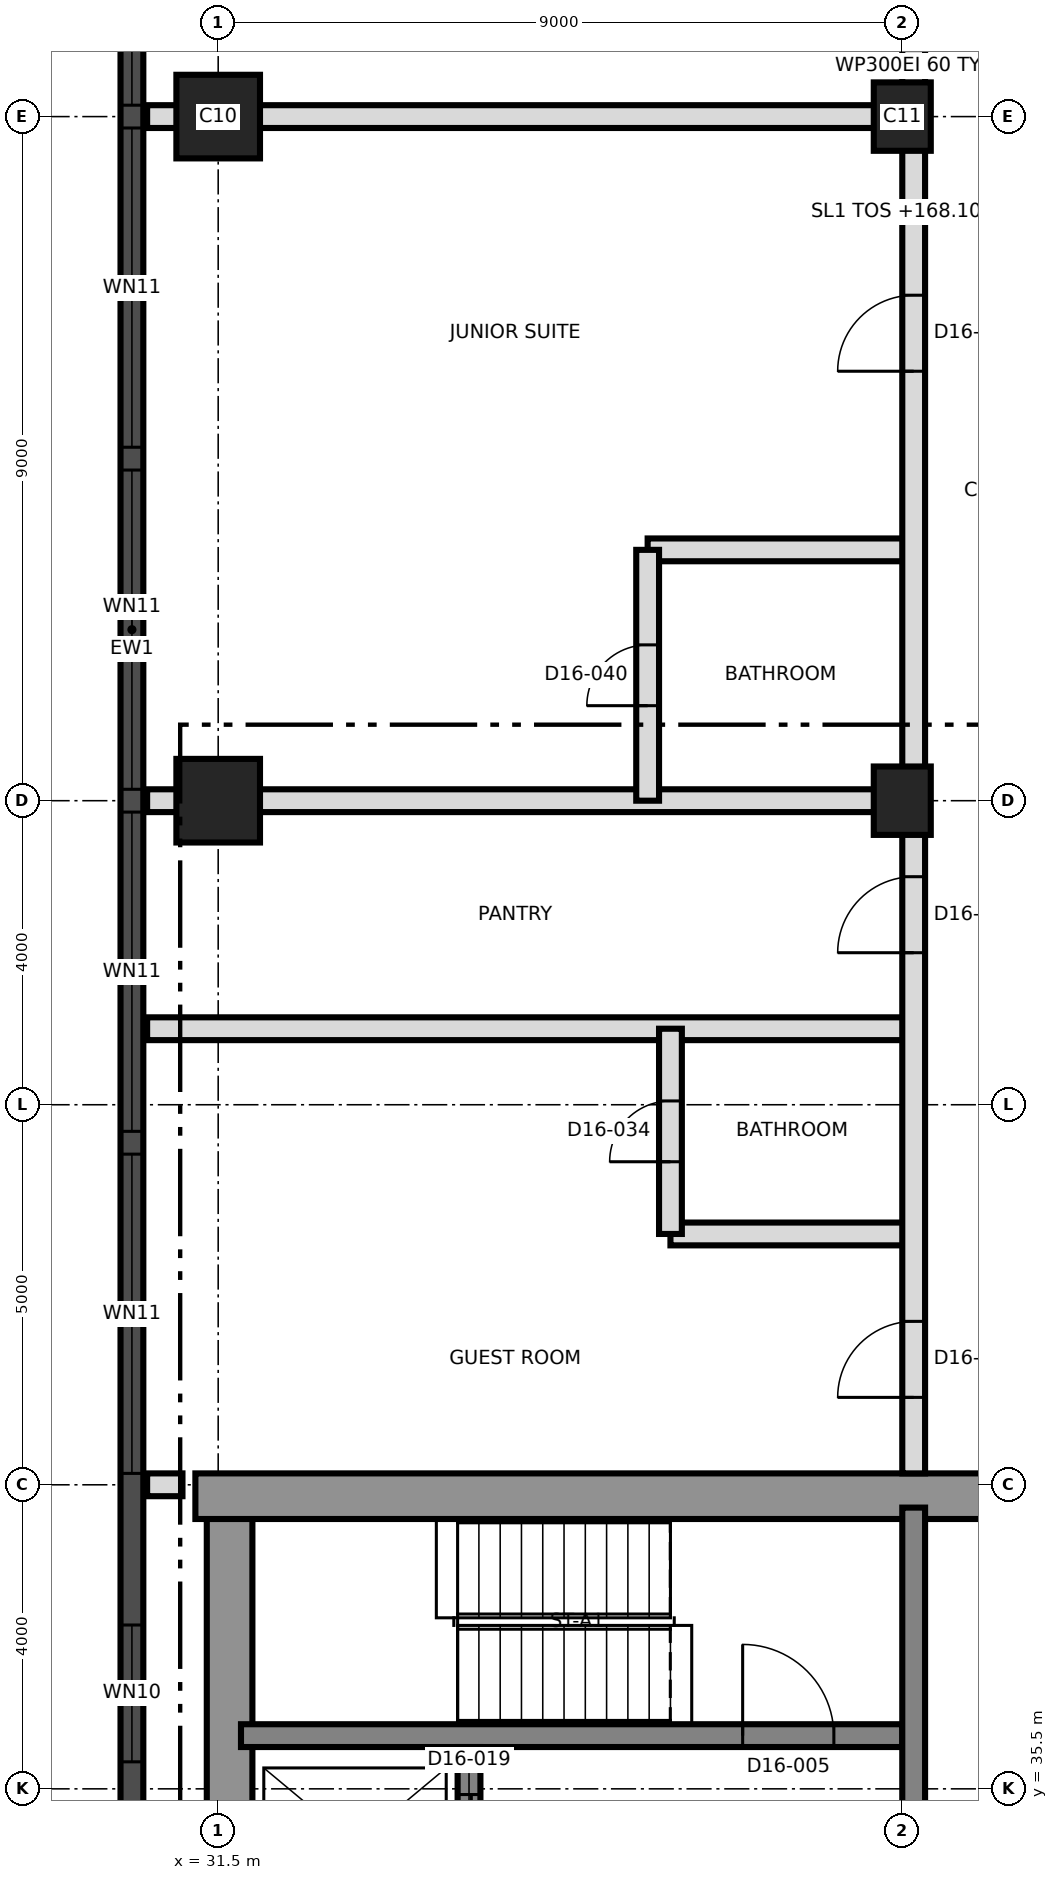
"""IFC4 building model, lengths in metres.
Left out: names, types, materials, properties, quantities, classifications, styles, units other than length and angle.
Written with IfcOpenShell. Run it as: python <this file> out.ifc"""

import sys

from ifc_helpers import new_model, si_unit, direction, frame, frame_2d, origin, origin_2d, place, context, subcontext, project, spatial, rectangle, extrude, element, fill, save


model = new_model("IFC4")
c1 = context("Model", 3, precision=1e-05, world=origin(), true_north=direction((0.0, 1.0)))
c2 = subcontext(c1, "Body", "Model", "MODEL_VIEW")
j1 = project(units=[si_unit("LENGTHUNIT", "METRE"), si_unit("PLANEANGLEUNIT", "RADIAN")], contexts=[c1])
p1 = place(None, origin())
s1 = spatial("IfcSite", under=j1, at=p1, CompositionType="ELEMENT")
p2 = place(p1, origin())
s2 = spatial("IfcBuilding", under=s1, at=p2, CompositionType="ELEMENT")
p3 = place(p2, frame((0.0, 0.0, 168.1)))
s3 = spatial("IfcBuildingStorey", under=s2, at=p3, CompositionType="ELEMENT", Elevation=168.1)
p4 = place(p3, frame((31.65, 21.8, 0.0), z_axis=(0.0, 0.0, 1.0), x_axis=(0.0, 1.0, 0.0)))
e1 = element("IfcWall", 1, at=p4, inside=s3, PredefinedType="SHEAR", context=c2, shape_type="SweptSolid", body=[
    extrude(rectangle(XDim=17.4, YDim=0.6, at=frame_2d((8.7, 0.0))), origin(), (0.0, 0.0, 1.0), 3.7),
])
p5 = place(p3, frame((31.2, 39.35, 0.0), z_axis=(0.0, 0.0, 1.0), x_axis=(1.0, 0.0, 0.0)))
e2 = element("IfcWall", 2, at=p5, inside=s3, PredefinedType="SHEAR", context=c2, shape_type="SweptSolid", body=[
    extrude(rectangle(XDim=27.0, YDim=0.6, at=frame_2d((13.5, 0.0))), origin(), (0.0, 0.0, 1.0), 3.7),
])
p6 = place(p5, frame((10.5, 0.0, 0.0)))
e3 = element("IfcOpeningElement", 3, at=p6, cuts=e2, PredefinedType="OPENING", context=c2, shape_type="SweptSolid", body=[
    extrude(rectangle(XDim=1.2, YDim=2.1, at=frame_2d((0.6, 1.05))), frame((0.0, 0.31, 0.0), z_axis=(0.0, -1.0, 0.0), x_axis=(1.0, 0.0, 0.0)), (0.0, 0.0, 1.0), 0.62),
])
p7 = place(p3, frame((31.8, 36.2, 0.0), z_axis=(0.0, 0.0, 1.0), x_axis=(1.0, 0.0, 0.0)))
e4 = element("IfcWall", 4, at=p7, inside=s3, PredefinedType="SHEAR", context=c2, shape_type="SweptSolid", body=[
    extrude(rectangle(XDim=8.7, YDim=0.3, at=frame_2d((4.35, 0.0))), origin(), (0.0, 0.0, 1.0), 3.7),
])
p8 = place(p7, frame((6.6, 0.0, 0.0)))
e5 = element("IfcOpeningElement", 5, at=p8, cuts=e4, PredefinedType="OPENING", context=c2, shape_type="SweptSolid", body=[
    extrude(rectangle(XDim=1.2, YDim=2.1, at=frame_2d((0.6, 1.05))), frame((0.0, 0.16, 0.0), z_axis=(0.0, -1.0, 0.0), x_axis=(1.0, 0.0, 0.0)), (0.0, 0.0, 1.0), 0.32),
])
p9 = place(p3, frame((40.65, 33.5, 0.0), z_axis=(0.0, 0.0, 1.0), x_axis=(0.0, 1.0, 0.0)))
e6 = element("IfcWall", 6, at=p9, inside=s3, PredefinedType="SHEAR", context=c2, shape_type="SweptSolid", body=[
    extrude(rectangle(XDim=5.7, YDim=0.3, at=frame_2d((2.85, 0.0))), origin(), (0.0, 0.0, 1.0), 3.7),
])
p10 = place(p3, frame((34.8, 33.5, 0.0), z_axis=(0.0, 0.0, 1.0), x_axis=(0.0, 1.0, 0.0)))
e7 = element("IfcWall", 7, at=p10, inside=s3, PredefinedType="SHEAR", context=c2, shape_type="SweptSolid", body=[
    extrude(rectangle(XDim=2.55, YDim=0.3, at=frame_2d((1.275, 0.0))), origin(), (0.0, 0.0, 1.0), 3.7),
])
p11 = place(p10, frame((0.625, 0.0, 0.0)))
e8 = element("IfcOpeningElement", 8, at=p11, cuts=e7, PredefinedType="OPENING", context=c2, shape_type="SweptSolid", body=[
    extrude(rectangle(XDim=1.3, YDim=2.4, at=frame_2d((0.65, 1.2))), frame((0.0, 0.16, 0.0), z_axis=(0.0, -1.0, 0.0), x_axis=(1.0, 0.0, 0.0)), (0.0, 0.0, 1.0), 0.32),
])
p12 = place(p3, frame((31.5, 48.5, 0.0), z_axis=(0.0, 0.0, 1.0), x_axis=(1.0, 0.0, 0.0)))
e9 = element("IfcColumn", 9, at=p12, inside=s3, PredefinedType="COLUMN", context=c2, shape_type="SweptSolid", body=[
    extrude(rectangle(XDim=1.1, YDim=1.1, at=origin_2d()), origin(), (0.0, 0.0, 1.0), 3.7),
])
p13 = place(p3, frame((40.5, 48.5, 0.0), z_axis=(0.0, 0.0, 1.0), x_axis=(0.0, 1.0, 0.0)))
e10 = element("IfcColumn", 10, at=p13, inside=s3, PredefinedType="COLUMN", context=c2, shape_type="SweptSolid", body=[
    extrude(rectangle(XDim=0.9, YDim=0.75, at=origin_2d()), origin(), (0.0, 0.0, 1.0), 3.7),
])
p14 = place(p3, frame((31.5, 57.5, 0.0), z_axis=(0.0, 0.0, 1.0), x_axis=(1.0, 0.0, 0.0)))
e11 = element("IfcColumn", 11, at=p14, inside=s3, PredefinedType="COLUMN", context=c2, shape_type="SweptSolid", body=[
    extrude(rectangle(XDim=1.1, YDim=1.1, at=origin_2d()), origin(), (0.0, 0.0, 1.0), 3.7),
])
p15 = place(p3, frame((40.5, 57.5, 0.0), z_axis=(0.0, 0.0, 1.0), x_axis=(0.0, 1.0, 0.0)))
e12 = element("IfcColumn", 12, at=p15, inside=s3, PredefinedType="COLUMN", context=c2, shape_type="SweptSolid", body=[
    extrude(rectangle(XDim=0.9, YDim=0.75, at=origin_2d()), origin(), (0.0, 0.0, 1.0), 3.7),
])
p16 = place(p3, frame((30.365, 66.992, 0.0), z_axis=(0.0, 0.0, 1.0), x_axis=(0.0, -1.0, 0.0)))
e13 = element("IfcWall", 13, at=p16, inside=s3, PredefinedType="SOLIDWALL", context=c2, shape_type="SweptSolid", body=[
    extrude(rectangle(XDim=32.981, YDim=0.3, at=frame_2d((16.491, 0.0))), origin(), (0.0, 0.0, 1.0), 3.4),
])
p17 = place(p16, frame((1.596, 0.0, 0.3)))
e14 = element("IfcOpeningElement", 14, at=p17, cuts=e13, PredefinedType="OPENING", context=c2, shape_type="SweptSolid", body=[
    extrude(rectangle(XDim=1.8, YDim=2.4, at=frame_2d((0.9, 1.2))), frame((0.0, 0.16, 0.0), z_axis=(0.0, -1.0, 0.0), x_axis=(1.0, 0.0, 0.0)), (0.0, 0.0, 1.0), 0.32),
])
p18 = place(p16, frame((5.142, 0.0, 0.9)))
e15 = element("IfcOpeningElement", 15, at=p18, cuts=e13, PredefinedType="OPENING", context=c2, shape_type="SweptSolid", body=[
    extrude(rectangle(XDim=4.2, YDim=1.5, at=frame_2d((2.1, 0.75))), frame((0.0, 0.16, 0.0), z_axis=(0.0, -1.0, 0.0), x_axis=(1.0, 0.0, 0.0)), (0.0, 0.0, 1.0), 0.32),
])
p19 = place(p16, frame((9.642, 0.0, 0.9)))
e16 = element("IfcOpeningElement", 16, at=p19, cuts=e13, PredefinedType="OPENING", context=c2, shape_type="SweptSolid", body=[
    extrude(rectangle(XDim=4.2, YDim=1.5, at=frame_2d((2.1, 0.75))), frame((0.0, 0.16, 0.0), z_axis=(0.0, -1.0, 0.0), x_axis=(1.0, 0.0, 0.0)), (0.0, 0.0, 1.0), 0.32),
])
p20 = place(p16, frame((14.142, 0.0, 0.9)))
e17 = element("IfcOpeningElement", 17, at=p20, cuts=e13, PredefinedType="OPENING", context=c2, shape_type="SweptSolid", body=[
    extrude(rectangle(XDim=4.2, YDim=1.5, at=frame_2d((2.1, 0.75))), frame((0.0, 0.16, 0.0), z_axis=(0.0, -1.0, 0.0), x_axis=(1.0, 0.0, 0.0)), (0.0, 0.0, 1.0), 0.32),
])
p21 = place(p16, frame((18.642, 0.0, 0.9)))
e18 = element("IfcOpeningElement", 18, at=p21, cuts=e13, PredefinedType="OPENING", context=c2, shape_type="SweptSolid", body=[
    extrude(rectangle(XDim=4.2, YDim=1.5, at=frame_2d((2.1, 0.75))), frame((0.0, 0.16, 0.0), z_axis=(0.0, -1.0, 0.0), x_axis=(1.0, 0.0, 0.0)), (0.0, 0.0, 1.0), 0.32),
])
p22 = place(p16, frame((23.142, 0.0, 0.9)))
e19 = element("IfcOpeningElement", 19, at=p22, cuts=e13, PredefinedType="OPENING", context=c2, shape_type="SweptSolid", body=[
    extrude(rectangle(XDim=4.2, YDim=1.5, at=frame_2d((2.1, 0.75))), frame((0.0, 0.16, 0.0), z_axis=(0.0, -1.0, 0.0), x_axis=(1.0, 0.0, 0.0)), (0.0, 0.0, 1.0), 0.32),
])
p23 = place(p16, frame((29.337, 0.0, 0.3)))
e20 = element("IfcOpeningElement", 20, at=p23, cuts=e13, PredefinedType="OPENING", context=c2, shape_type="SweptSolid", body=[
    extrude(rectangle(XDim=1.8, YDim=2.4, at=frame_2d((0.9, 1.2))), frame((0.0, 0.16, 0.0), z_axis=(0.0, -1.0, 0.0), x_axis=(1.0, 0.0, 0.0)), (0.0, 0.0, 1.0), 0.32),
])
p24 = place(p3, frame((30.565, 39.5, 0.0), z_axis=(0.0, 0.0, 1.0), x_axis=(1.0, 0.0, 0.0)))
e21 = element("IfcWall", 21, at=p24, inside=s3, PredefinedType="PARTITIONING", context=c2, shape_type="SweptSolid", body=[
    extrude(rectangle(XDim=0.465, YDim=0.3, at=frame_2d((0.232, 0.0))), origin(), (0.0, 0.0, 1.0), 3.4),
])
p25 = place(p3, frame((37.45, 42.8, 0.0), z_axis=(0.0, 0.0, 1.0), x_axis=(1.0, 0.0, 0.0)))
e22 = element("IfcWall", 22, at=p25, inside=s3, PredefinedType="PARTITIONING", context=c2, shape_type="SweptSolid", body=[
    extrude(rectangle(XDim=3.2, YDim=0.3, at=frame_2d((1.6, 0.0))), origin(), (0.0, 0.0, 1.0), 3.4),
])
for number, where, z_axis, x_axis in (
    (23, (30.565, 45.5, 0.0), (0.0, 0.0, 1.0), (1.0, 0.0, 0.0)),
    (24, (30.565, 48.5, 0.0), (0.0, 0.0, 1.0), (1.0, 0.0, 0.0)),
):
    element("IfcWall", number, at=place(p3, frame(where, z_axis=z_axis, x_axis=x_axis)), inside=s3, PredefinedType="PARTITIONING", context=c2, shape_type="SweptSolid", body=[
        extrude(rectangle(XDim=10.085, YDim=0.3, at=frame_2d((5.042, 0.0))), origin(), (0.0, 0.0, 1.0), 3.4),
    ])
p26 = place(p3, frame((37.15, 51.8, 0.0), z_axis=(0.0, 0.0, 1.0), x_axis=(1.0, 0.0, 0.0)))
e25 = element("IfcWall", 25, at=p26, inside=s3, PredefinedType="PARTITIONING", context=c2, shape_type="SweptSolid", body=[
    extrude(rectangle(XDim=3.5, YDim=0.3, at=frame_2d((1.75, 0.0))), origin(), (0.0, 0.0, 1.0), 3.4),
])
p27 = place(p3, frame((30.565, 57.5, 0.0), z_axis=(0.0, 0.0, 1.0), x_axis=(1.0, 0.0, 0.0)))
e26 = element("IfcWall", 26, at=p27, inside=s3, PredefinedType="PARTITIONING", context=c2, shape_type="SweptSolid", body=[
    extrude(rectangle(XDim=10.085, YDim=0.3, at=frame_2d((5.042, 0.0))), origin(), (0.0, 0.0, 1.0), 3.4),
])
p28 = place(p3, frame((37.15, 48.5, 0.0), z_axis=(0.0, 0.0, 1.0), x_axis=(0.0, 1.0, 0.0)))
e27 = element("IfcWall", 27, at=p28, inside=s3, PredefinedType="PARTITIONING", context=c2, shape_type="SweptSolid", body=[
    extrude(rectangle(XDim=3.3, YDim=0.3, at=frame_2d((1.65, 0.0))), origin(), (0.0, 0.0, 1.0), 3.4),
])
p29 = place(p28, frame((1.25, 0.0, 0.0)))
e28 = element("IfcOpeningElement", 28, at=p29, cuts=e27, PredefinedType="OPENING", context=c2, shape_type="SweptSolid", body=[
    extrude(rectangle(XDim=0.8, YDim=2.1, at=frame_2d((0.4, 1.05))), frame((0.0, 0.16, 0.0), z_axis=(0.0, -1.0, 0.0), x_axis=(1.0, 0.0, 0.0)), (0.0, 0.0, 1.0), 0.32),
])
p30 = place(p3, frame((37.45, 42.8, 0.0), z_axis=(0.0, 0.0, 1.0), x_axis=(0.0, 1.0, 0.0)))
e29 = element("IfcWall", 29, at=p30, inside=s3, PredefinedType="PARTITIONING", context=c2, shape_type="SweptSolid", body=[
    extrude(rectangle(XDim=2.7, YDim=0.3, at=frame_2d((1.35, 0.0))), origin(), (0.0, 0.0, 1.0), 3.4),
])
p31 = place(p30, frame((0.95, 0.0, 0.0)))
e30 = element("IfcOpeningElement", 30, at=p31, cuts=e29, PredefinedType="OPENING", context=c2, shape_type="SweptSolid", body=[
    extrude(rectangle(XDim=0.8, YDim=2.1, at=frame_2d((0.4, 1.05))), frame((0.0, 0.16, 0.0), z_axis=(0.0, -1.0, 0.0), x_axis=(1.0, 0.0, 0.0)), (0.0, 0.0, 1.0), 0.32),
])
p32 = place(p3, frame((40.65, 39.65, 0.0), z_axis=(0.0, 0.0, 1.0), x_axis=(0.0, 1.0, 0.0)))
e31 = element("IfcWall", 31, at=p32, inside=s3, PredefinedType="PARTITIONING", context=c2, shape_type="SweptSolid", body=[
    extrude(rectangle(XDim=37.025, YDim=0.3, at=frame_2d((18.513, 0.0))), origin(), (0.0, 0.0, 1.0), 3.4),
])
p33 = place(p32, frame((1.0, 0.0, 0.0)))
e32 = element("IfcOpeningElement", 32, at=p33, cuts=e31, PredefinedType="OPENING", context=c2, shape_type="SweptSolid", body=[
    extrude(rectangle(XDim=1.0, YDim=2.1, at=frame_2d((0.5, 1.05))), frame((0.0, 0.16, 0.0), z_axis=(0.0, -1.0, 0.0), x_axis=(1.0, 0.0, 0.0)), (0.0, 0.0, 1.0), 0.32),
])
p34 = place(p32, frame((6.85, 0.0, 0.0)))
e33 = element("IfcOpeningElement", 33, at=p34, cuts=e31, PredefinedType="OPENING", context=c2, shape_type="SweptSolid", body=[
    extrude(rectangle(XDim=1.0, YDim=2.1, at=frame_2d((0.5, 1.05))), frame((0.0, 0.16, 0.0), z_axis=(0.0, -1.0, 0.0), x_axis=(1.0, 0.0, 0.0)), (0.0, 0.0, 1.0), 0.32),
])
p35 = place(p32, frame((14.5, 0.0, 0.0)))
e34 = element("IfcOpeningElement", 34, at=p35, cuts=e31, PredefinedType="OPENING", context=c2, shape_type="SweptSolid", body=[
    extrude(rectangle(XDim=1.0, YDim=2.4, at=frame_2d((0.5, 1.2))), frame((0.0, 0.16, 0.0), z_axis=(0.0, -1.0, 0.0), x_axis=(1.0, 0.0, 0.0)), (0.0, 0.0, 1.0), 0.32),
])
p36 = place(p32, frame((21.35, 0.0, 0.0)))
e35 = element("IfcOpeningElement", 35, at=p36, cuts=e31, PredefinedType="OPENING", context=c2, shape_type="SweptSolid", body=[
    extrude(rectangle(XDim=1.0, YDim=2.4, at=frame_2d((0.5, 1.2))), frame((0.0, 0.16, 0.0), z_axis=(0.0, -1.0, 0.0), x_axis=(1.0, 0.0, 0.0)), (0.0, 0.0, 1.0), 0.32),
])
p37 = place(p18, origin())
e36 = element("IfcWindow", 36, at=p37, inside=s3, PartitioningType="SINGLE_PANEL", PredefinedType="WINDOW", context=c2, shape_type="SweptSolid", body=[
    extrude(rectangle(XDim=4.2, YDim=1.5, at=frame_2d((2.1, 0.75))), frame((0.0, 0.03, 0.0), z_axis=(0.0, -1.0, 0.0), x_axis=(1.0, 0.0, 0.0)), (0.0, 0.0, 1.0), 0.06),
])
fill(e15, e36)
p38 = place(p19, origin())
e37 = element("IfcWindow", 37, at=p38, inside=s3, PartitioningType="SINGLE_PANEL", PredefinedType="WINDOW", context=c2, shape_type="SweptSolid", body=[
    extrude(rectangle(XDim=4.2, YDim=1.5, at=frame_2d((2.1, 0.75))), frame((0.0, 0.03, 0.0), z_axis=(0.0, -1.0, 0.0), x_axis=(1.0, 0.0, 0.0)), (0.0, 0.0, 1.0), 0.06),
])
fill(e16, e37)
p39 = place(p20, origin())
e38 = element("IfcWindow", 38, at=p39, inside=s3, PartitioningType="SINGLE_PANEL", PredefinedType="WINDOW", context=c2, shape_type="SweptSolid", body=[
    extrude(rectangle(XDim=4.2, YDim=1.5, at=frame_2d((2.1, 0.75))), frame((0.0, 0.03, 0.0), z_axis=(0.0, -1.0, 0.0), x_axis=(1.0, 0.0, 0.0)), (0.0, 0.0, 1.0), 0.06),
])
fill(e17, e38)
p40 = place(p21, origin())
e39 = element("IfcWindow", 39, at=p40, inside=s3, PartitioningType="SINGLE_PANEL", PredefinedType="WINDOW", context=c2, shape_type="SweptSolid", body=[
    extrude(rectangle(XDim=4.2, YDim=1.5, at=frame_2d((2.1, 0.75))), frame((0.0, 0.03, 0.0), z_axis=(0.0, -1.0, 0.0), x_axis=(1.0, 0.0, 0.0)), (0.0, 0.0, 1.0), 0.06),
])
fill(e18, e39)
p41 = place(p22, origin())
e40 = element("IfcWindow", 40, at=p41, inside=s3, PartitioningType="SINGLE_PANEL", PredefinedType="WINDOW", context=c2, shape_type="SweptSolid", body=[
    extrude(rectangle(XDim=4.2, YDim=1.5, at=frame_2d((2.1, 0.75))), frame((0.0, 0.03, 0.0), z_axis=(0.0, -1.0, 0.0), x_axis=(1.0, 0.0, 0.0)), (0.0, 0.0, 1.0), 0.06),
])
fill(e19, e40)
p42 = place(p23, origin())
e41 = element("IfcWindow", 41, at=p42, inside=s3, PartitioningType="SINGLE_PANEL", PredefinedType="WINDOW", context=c2, shape_type="SweptSolid", body=[
    extrude(rectangle(XDim=1.8, YDim=2.4, at=frame_2d((0.9, 1.2))), frame((0.0, 0.03, 0.0), z_axis=(0.0, -1.0, 0.0), x_axis=(1.0, 0.0, 0.0)), (0.0, 0.0, 1.0), 0.06),
])
fill(e20, e41)
p43 = place(p8, origin())
e42 = element("IfcDoor", 42, at=p43, inside=s3, OperationType="SINGLE_SWING_RIGHT", PredefinedType="DOOR", context=c2, shape_type="SweptSolid", body=[
    extrude(rectangle(XDim=1.2, YDim=2.1, at=frame_2d((0.6, 1.05))), frame((0.0, 0.025, 0.0), z_axis=(0.0, -1.0, 0.0), x_axis=(1.0, 0.0, 0.0)), (0.0, 0.0, 1.0), 0.05),
])
fill(e5, e42)
p44 = place(p11, origin())
e43 = element("IfcDoor", 43, at=p44, inside=s3, OperationType="SLIDING_TO_LEFT", PredefinedType="DOOR", context=c2, shape_type="SweptSolid", body=[
    extrude(rectangle(XDim=1.3, YDim=2.4, at=frame_2d((0.65, 1.2))), frame((0.0, 0.025, 0.0), z_axis=(0.0, -1.0, 0.0), x_axis=(1.0, 0.0, 0.0)), (0.0, 0.0, 1.0), 0.05),
])
fill(e8, e43)
p45 = place(p31, origin())
e44 = element("IfcDoor", 44, at=p45, inside=s3, OperationType="SINGLE_SWING_LEFT", PredefinedType="DOOR", context=c2, shape_type="SweptSolid", body=[
    extrude(rectangle(XDim=0.8, YDim=2.1, at=frame_2d((0.4, 1.05))), frame((0.0, 0.025, 0.0), z_axis=(0.0, -1.0, 0.0), x_axis=(1.0, 0.0, 0.0)), (0.0, 0.0, 1.0), 0.05),
])
fill(e30, e44)
p46 = place(p33, origin())
e45 = element("IfcDoor", 45, at=p46, inside=s3, OperationType="SINGLE_SWING_RIGHT", PredefinedType="DOOR", context=c2, shape_type="SweptSolid", body=[
    extrude(rectangle(XDim=1.0, YDim=2.1, at=frame_2d((0.5, 1.05))), frame((0.0, 0.025, 0.0), z_axis=(0.0, -1.0, 0.0), x_axis=(1.0, 0.0, 0.0)), (0.0, 0.0, 1.0), 0.05),
])
fill(e32, e45)
p47 = place(p34, origin())
e46 = element("IfcDoor", 46, at=p47, inside=s3, OperationType="SINGLE_SWING_LEFT", PredefinedType="DOOR", context=c2, shape_type="SweptSolid", body=[
    extrude(rectangle(XDim=1.0, YDim=2.1, at=frame_2d((0.5, 1.05))), frame((0.0, 0.025, 0.0), z_axis=(0.0, -1.0, 0.0), x_axis=(1.0, 0.0, 0.0)), (0.0, 0.0, 1.0), 0.05),
])
fill(e33, e46)
p48 = place(p29, origin())
e47 = element("IfcDoor", 47, at=p48, inside=s3, OperationType="SINGLE_SWING_LEFT", PredefinedType="DOOR", context=c2, shape_type="SweptSolid", body=[
    extrude(rectangle(XDim=0.8, YDim=2.1, at=frame_2d((0.4, 1.05))), frame((0.0, 0.025, 0.0), z_axis=(0.0, -1.0, 0.0), x_axis=(1.0, 0.0, 0.0)), (0.0, 0.0, 1.0), 0.05),
])
fill(e28, e47)
p49 = place(p35, origin())
e48 = element("IfcDoor", 48, at=p49, inside=s3, OperationType="SINGLE_SWING_RIGHT", PredefinedType="DOOR", context=c2, shape_type="SweptSolid", body=[
    extrude(rectangle(XDim=1.0, YDim=2.4, at=frame_2d((0.5, 1.2))), frame((0.0, 0.025, 0.0), z_axis=(0.0, -1.0, 0.0), x_axis=(1.0, 0.0, 0.0)), (0.0, 0.0, 1.0), 0.05),
])
fill(e34, e48)
save(model, sys.argv[1])
